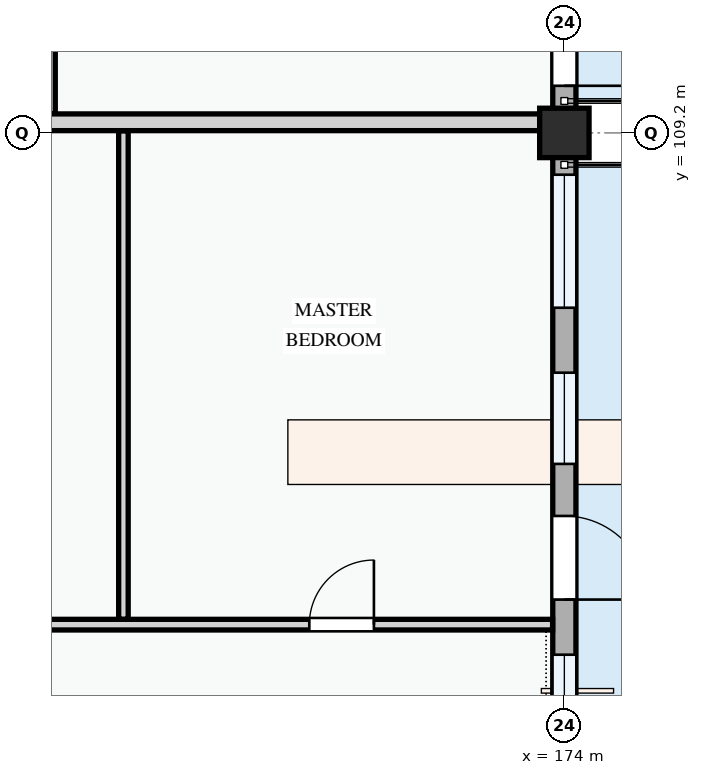
"""IFC4 building model, lengths in metres.
Left out: names, types, materials, properties, quantities, classifications, styles, units other than length and angle.
Written with IfcOpenShell. Run it as: python <this file> out.ifc"""

import sys

from ifc_helpers import new_model, si_unit, direction, frame, frame_2d, origin, origin_2d, place, context, subcontext, project, spatial, rectangle, extrude, element, fill, save


model = new_model("IFC4")
c1 = context("Model", 3, precision=1e-05, world=origin(), true_north=direction((0.0, 1.0)))
c2 = subcontext(c1, "Body", "Model", "MODEL_VIEW")
j1 = project(units=[si_unit("LENGTHUNIT", "METRE"), si_unit("PLANEANGLEUNIT", "RADIAN")], contexts=[c1])
p1 = place(None, origin())
s1 = spatial("IfcSite", under=j1, at=p1, CompositionType="ELEMENT")
p2 = place(p1, origin())
s2 = spatial("IfcBuilding", under=s1, at=p2, CompositionType="ELEMENT")
p3 = place(p2, frame((0.0, 0.0, 21.3)))
s3 = spatial("IfcBuildingStorey", under=s2, at=p3, CompositionType="ELEMENT", Elevation=21.3)
p4 = place(p3, frame((174.0, 109.2, 0.0), z_axis=(0.0, 0.0, 1.0), x_axis=(1.0, 0.0, 0.0)))
e1 = element("IfcColumn", 1, at=p4, inside=s3, PredefinedType="COLUMN", context=c2, shape_type="SweptSolid", body=[
    extrude(rectangle(XDim=0.65, YDim=0.65, at=origin_2d()), origin(), (0.0, 0.0, 1.0), 3.3),
])
p5 = place(p3, frame((174.0, 109.2, 0.0), z_axis=(0.0, 0.0, 1.0), x_axis=(0.0, 1.0, 0.0)))
e2 = element("IfcWall", 2, at=p5, inside=s3, PredefinedType="STANDARD", context=c2, shape_type="SweptSolid", body=[
    extrude(rectangle(XDim=6.0, YDim=0.305, at=frame_2d((3.0, 0.0))), origin(), (0.0, 0.0, 1.0), 2.575),
])
p6 = place(p5, frame((0.62, 0.0, 0.0)))
e3 = element("IfcOpeningElement", 3, at=p6, cuts=e2, PredefinedType="OPENING", context=c2, shape_type="SweptSolid", body=[
    extrude(rectangle(XDim=1.3, YDim=2.15, at=frame_2d((0.65, 1.075))), frame((0.0, 0.163, 0.0), z_axis=(0.0, -1.0, 0.0), x_axis=(1.0, 0.0, 0.0)), (0.0, 0.0, 1.0), 0.325),
])
p7 = place(p5, frame((3.29, 0.0, 0.78)))
e4 = element("IfcOpeningElement", 4, at=p7, cuts=e2, PredefinedType="OPENING", context=c2, shape_type="SweptSolid", body=[
    extrude(rectangle(XDim=1.2, YDim=1.5, at=frame_2d((0.6, 0.75))), frame((0.0, 0.163, 0.0), z_axis=(0.0, -1.0, 0.0), x_axis=(1.0, 0.0, 0.0)), (0.0, 0.0, 1.0), 0.325),
])
p8 = place(p3, frame((174.0, 100.8, 0.0), z_axis=(0.0, 0.0, 1.0), x_axis=(0.0, 1.0, 0.0)))
e5 = element("IfcWall", 5, at=p8, inside=s3, PredefinedType="STANDARD", context=c2, shape_type="SweptSolid", body=[
    extrude(rectangle(XDim=8.4, YDim=0.305, at=frame_2d((4.2, 0.0))), origin(), (0.0, 0.0, 1.0), 2.425),
])
p9 = place(p8, frame((2.261, 0.0, 0.0)))
e6 = element("IfcOpeningElement", 6, at=p9, cuts=e5, PredefinedType="OPENING", context=c2, shape_type="SweptSolid", body=[
    extrude(rectangle(XDim=1.1, YDim=2.15, at=frame_2d((0.55, 1.075))), frame((0.0, 0.163, 0.0), z_axis=(0.0, -1.0, 0.0), x_axis=(1.0, 0.0, 0.0)), (0.0, 0.0, 1.0), 0.325),
])
p10 = place(p8, frame((0.585, 0.0, 0.78)))
e7 = element("IfcOpeningElement", 7, at=p10, cuts=e5, PredefinedType="OPENING", context=c2, shape_type="SweptSolid", body=[
    extrude(rectangle(XDim=0.95, YDim=1.15, at=frame_2d((0.475, 0.575))), frame((0.0, 0.163, 0.0), z_axis=(0.0, -1.0, 0.0), x_axis=(1.0, 0.0, 0.0)), (0.0, 0.0, 1.0), 0.325),
])
p11 = place(p8, frame((4.046, 0.0, 0.78)))
e8 = element("IfcOpeningElement", 8, at=p11, cuts=e5, PredefinedType="OPENING", context=c2, shape_type="SweptSolid", body=[
    extrude(rectangle(XDim=1.2, YDim=1.35, at=frame_2d((0.6, 0.675))), frame((0.0, 0.163, 0.0), z_axis=(0.0, -1.0, 0.0), x_axis=(1.0, 0.0, 0.0)), (0.0, 0.0, 1.0), 0.325),
])
p12 = place(p8, frame((6.1, 0.0, 0.78)))
e9 = element("IfcOpeningElement", 9, at=p12, cuts=e5, PredefinedType="OPENING", context=c2, shape_type="SweptSolid", body=[
    extrude(rectangle(XDim=1.75, YDim=1.45, at=frame_2d((0.875, 0.725))), frame((0.0, 0.163, 0.0), z_axis=(0.0, -1.0, 0.0), x_axis=(1.0, 0.0, 0.0)), (0.0, 0.0, 1.0), 0.325),
])
p13 = place(p3, frame((167.22, 109.452, 0.0), z_axis=(0.0, 0.0, 1.0), x_axis=(0.0, 1.0, 0.0)))
e10 = element("IfcWall", 10, at=p13, inside=s3, PredefinedType="PARTITIONING", context=c2, shape_type="SweptSolid", body=[
    extrude(rectangle(XDim=14.008, YDim=0.165, at=frame_2d((7.004, 0.0))), origin(), (0.0, 0.0, 1.0), 2.425),
])
p14 = place(p13, frame((2.438, 0.0, 0.0)))
e11 = element("IfcOpeningElement", 11, at=p14, cuts=e10, PredefinedType="OPENING", context=c2, shape_type="SweptSolid", body=[
    extrude(rectangle(XDim=0.92, YDim=2.1, at=frame_2d((0.46, 1.05))), frame((0.0, 0.093, 0.0), z_axis=(0.0, -1.0, 0.0), x_axis=(1.0, 0.0, 0.0)), (0.0, 0.0, 1.0), 0.185),
])
p15 = place(p3, frame((162.064, 102.731, 0.0), z_axis=(0.0, 0.0, 1.0), x_axis=(1.0, 0.0, 0.0)))
e12 = element("IfcWall", 12, at=p15, inside=s3, PredefinedType="PARTITIONING", context=c2, shape_type="SweptSolid", body=[
    extrude(rectangle(XDim=11.781, YDim=0.14, at=frame_2d((5.891, 0.0))), origin(), (0.0, 0.0, 1.0), 3.0),
])
p16 = place(p15, frame((0.951, 0.0, 0.0)))
e13 = element("IfcOpeningElement", 13, at=p16, cuts=e12, PredefinedType="OPENING", context=c2, shape_type="SweptSolid", body=[
    extrude(rectangle(XDim=0.8, YDim=2.1, at=frame_2d((0.4, 1.05))), frame((0.0, 0.08, 0.0), z_axis=(0.0, -1.0, 0.0), x_axis=(1.0, 0.0, 0.0)), (0.0, 0.0, 1.0), 0.16),
])
p17 = place(p15, frame((4.035, 0.0, 0.0)))
e14 = element("IfcOpeningElement", 14, at=p17, cuts=e12, PredefinedType="OPENING", context=c2, shape_type="SweptSolid", body=[
    extrude(rectangle(XDim=0.85, YDim=2.1, at=frame_2d((0.425, 1.05))), frame((0.0, 0.08, 0.0), z_axis=(0.0, -1.0, 0.0), x_axis=(1.0, 0.0, 0.0)), (0.0, 0.0, 1.0), 0.16),
])
p18 = place(p15, frame((8.58, 0.0, 0.0)))
e15 = element("IfcOpeningElement", 15, at=p18, cuts=e12, PredefinedType="OPENING", context=c2, shape_type="SweptSolid", body=[
    extrude(rectangle(XDim=0.85, YDim=2.1, at=frame_2d((0.425, 1.05))), frame((0.0, 0.08, 0.0), z_axis=(0.0, -1.0, 0.0), x_axis=(1.0, 0.0, 0.0)), (0.0, 0.0, 1.0), 0.16),
])
p19 = place(p3, frame((168.199, 102.803, 0.0), z_axis=(0.0, 0.0, 1.0), x_axis=(0.0, 1.0, 0.0)))
e16 = element("IfcWall", 16, at=p19, inside=s3, PredefinedType="PARTITIONING", context=c2, shape_type="SweptSolid", body=[
    extrude(rectangle(XDim=6.425, YDim=0.125, at=frame_2d((3.213, 0.0))), origin(), (0.0, 0.0, 1.0), 3.0),
])
p20 = place(p3, frame((162.064, 109.34, 0.0), z_axis=(0.0, 0.0, 1.0), x_axis=(1.0, 0.0, 0.0)))
e17 = element("IfcWall", 17, at=p20, inside=s3, PredefinedType="PARTITIONING", context=c2, shape_type="SweptSolid", body=[
    extrude(rectangle(XDim=11.781, YDim=0.22, at=frame_2d((5.891, 0.0))), origin(), (0.0, 0.0, 1.0), 2.375),
])
p21 = place(p6, frame((1.3, 0.0, 0.0), z_axis=(0.0, 0.0, 1.0), x_axis=(-1.0, 0.0, 0.0)))
e18 = element("IfcDoor", 18, at=p21, inside=s3, OperationType="SINGLE_SWING_RIGHT", PredefinedType="DOOR", context=c2, shape_type="SweptSolid", body=[
    extrude(rectangle(XDim=1.3, YDim=2.15, at=frame_2d((0.65, 1.075))), frame((0.0, 0.025, 0.0), z_axis=(0.0, -1.0, 0.0), x_axis=(1.0, 0.0, 0.0)), (0.0, 0.0, 1.0), 0.05),
])
fill(e3, e18)
p22 = place(p9, frame((1.1, 0.0, 0.0), z_axis=(0.0, 0.0, 1.0), x_axis=(-1.0, 0.0, 0.0)))
e19 = element("IfcDoor", 19, at=p22, inside=s3, OperationType="SINGLE_SWING_RIGHT", PredefinedType="DOOR", context=c2, shape_type="SweptSolid", body=[
    extrude(rectangle(XDim=1.1, YDim=2.15, at=frame_2d((0.55, 1.075))), frame((0.0, 0.025, 0.0), z_axis=(0.0, -1.0, 0.0), x_axis=(1.0, 0.0, 0.0)), (0.0, 0.0, 1.0), 0.05),
])
fill(e6, e19)
p23 = place(p10, origin())
e20 = element("IfcWindow", 20, at=p23, inside=s3, PartitioningType="SINGLE_PANEL", PredefinedType="WINDOW", context=c2, shape_type="SweptSolid", body=[
    extrude(rectangle(XDim=0.95, YDim=1.15, at=frame_2d((0.475, 0.575))), frame((0.0, 0.03, 0.0), z_axis=(0.0, -1.0, 0.0), x_axis=(1.0, 0.0, 0.0)), (0.0, 0.0, 1.0), 0.06),
])
fill(e7, e20)
p24 = place(p11, origin())
e21 = element("IfcWindow", 21, at=p24, inside=s3, PartitioningType="SINGLE_PANEL", PredefinedType="WINDOW", context=c2, shape_type="SweptSolid", body=[
    extrude(rectangle(XDim=1.2, YDim=1.35, at=frame_2d((0.6, 0.675))), frame((0.0, 0.03, 0.0), z_axis=(0.0, -1.0, 0.0), x_axis=(1.0, 0.0, 0.0)), (0.0, 0.0, 1.0), 0.06),
])
fill(e8, e21)
p25 = place(p12, origin())
e22 = element("IfcWindow", 22, at=p25, inside=s3, PartitioningType="DOUBLE_PANEL_VERTICAL", PredefinedType="WINDOW", context=c2, shape_type="SweptSolid", body=[
    extrude(rectangle(XDim=1.75, YDim=1.45, at=frame_2d((0.875, 0.725))), frame((0.0, 0.03, 0.0), z_axis=(0.0, -1.0, 0.0), x_axis=(1.0, 0.0, 0.0)), (0.0, 0.0, 1.0), 0.06),
])
fill(e9, e22)
p26 = place(p18, origin())
e23 = element("IfcDoor", 23, at=p26, inside=s3, OperationType="SINGLE_SWING_RIGHT", PredefinedType="DOOR", context=c2, shape_type="SweptSolid", body=[
    extrude(rectangle(XDim=0.85, YDim=2.1, at=frame_2d((0.425, 1.05))), frame((0.0, 0.025, 0.0), z_axis=(0.0, -1.0, 0.0), x_axis=(1.0, 0.0, 0.0)), (0.0, 0.0, 1.0), 0.05),
])
fill(e15, e23)
save(model, sys.argv[1])
